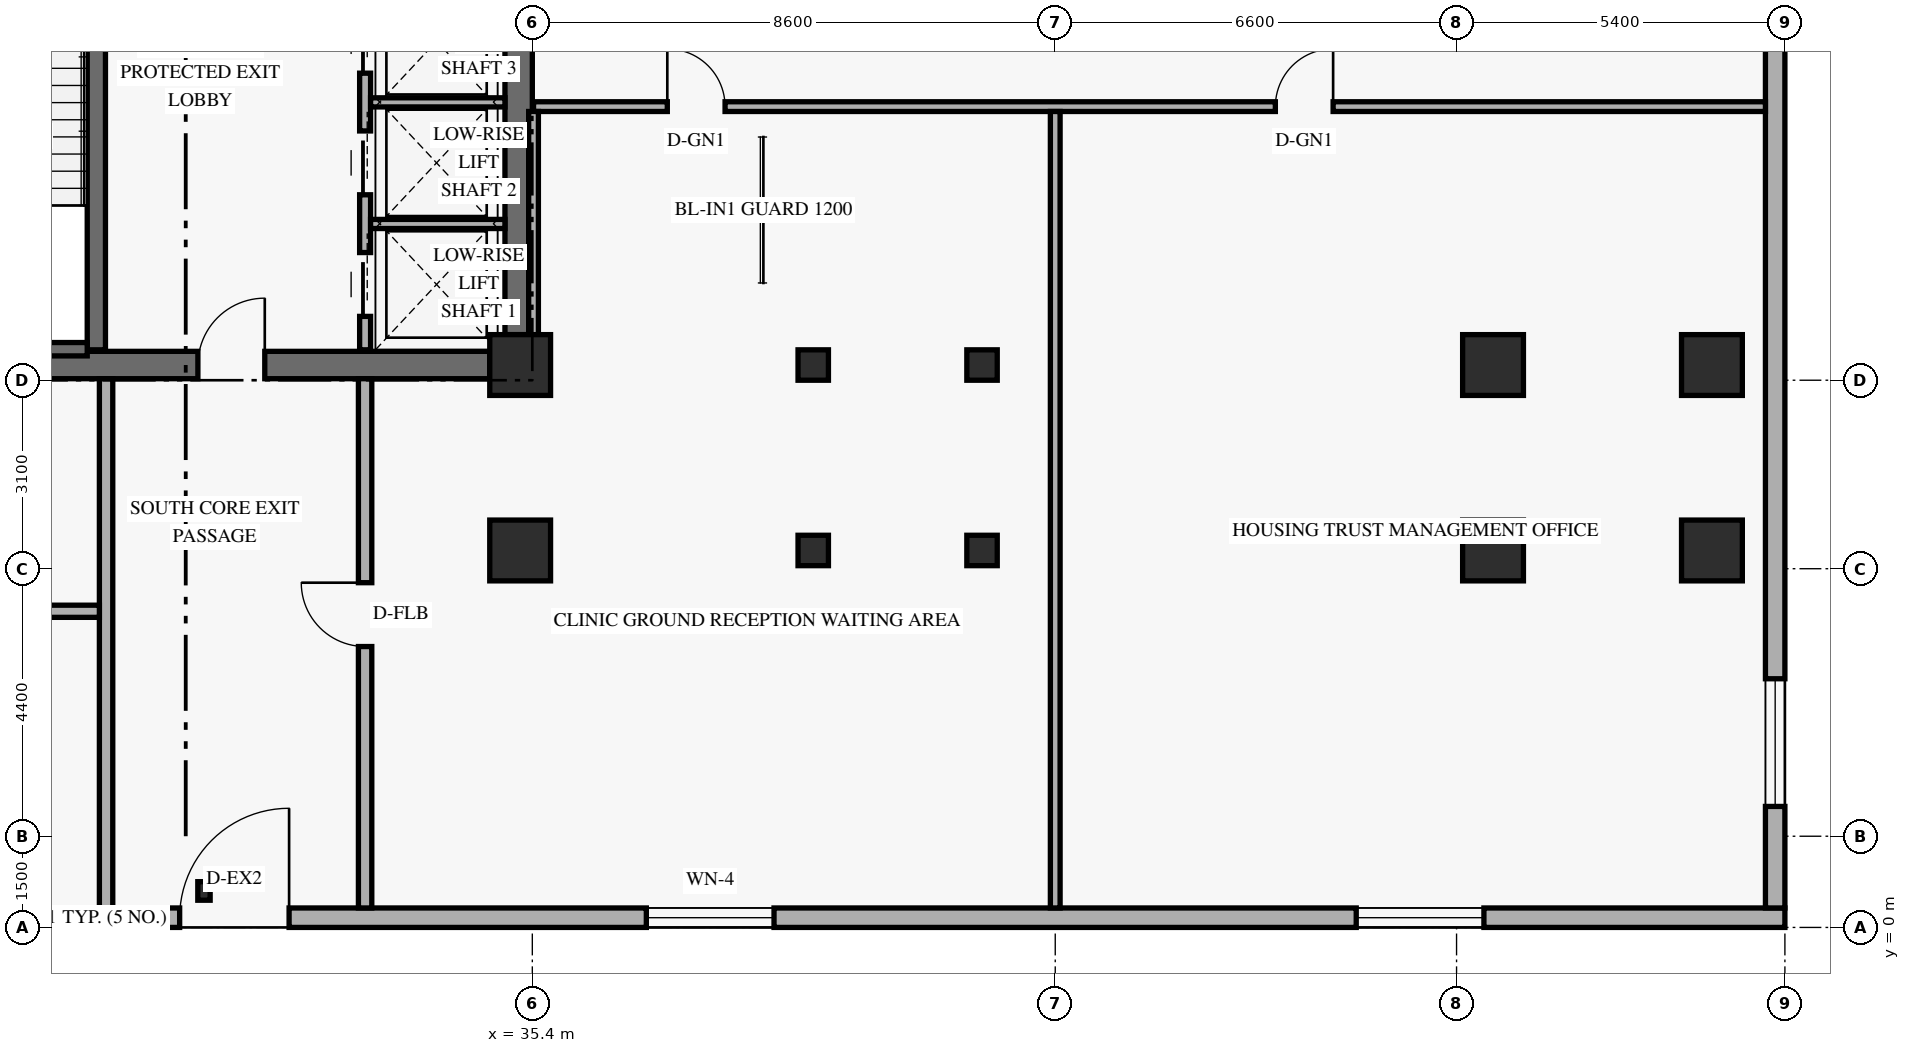
"""IFC4 building model, lengths in metres.
Left out: names, types, materials, properties, quantities, classifications, styles, units other than length and angle.
Written with IfcOpenShell. Run it as: python <this file> out.ifc"""

import sys

from ifc_helpers import new_model, si_unit, direction, frame, frame_2d, origin, origin_2d, place, context, subcontext, project, spatial, rectangle, hollow_rectangle, extrude, element, fill, save


model = new_model("IFC4")
c1 = context("Model", 3, precision=1e-05, world=origin(), true_north=direction((0.0, 1.0)))
c2 = subcontext(c1, "Body", "Model", "MODEL_VIEW")
j1 = project(units=[si_unit("LENGTHUNIT", "METRE"), si_unit("PLANEANGLEUNIT", "RADIAN")], contexts=[c1])
p1 = place(None, origin())
s1 = spatial("IfcSite", under=j1, at=p1, CompositionType="ELEMENT")
p2 = place(p1, origin())
s2 = spatial("IfcBuilding", under=s1, at=p2, CompositionType="ELEMENT")
p3 = place(p2, origin())
s3 = spatial("IfcBuildingStorey", under=s2, at=p3, CompositionType="ELEMENT", Elevation=0.0)
p4 = place(p3, frame((35.175, 9.75, 0.0), z_axis=(0.0, 0.0, 1.0), x_axis=(0.0, 1.0, 0.0)))
e1 = element("IfcWall", 1, at=p4, inside=s3, PredefinedType="SHEAR", context=c2, shape_type="SweptSolid", body=[
    extrude(rectangle(XDim=5.8, YDim=0.45, at=frame_2d((2.9, 0.0))), origin(), (0.0, 0.0, 1.0), 3.539),
])
p5 = place(p3, frame((24.7, 9.25, 0.0), z_axis=(0.0, 0.0, 1.0), x_axis=(1.0, 0.0, 0.0)))
e2 = element("IfcWall", 2, at=p5, inside=s3, PredefinedType="SHEAR", context=c2, shape_type="SweptSolid", body=[
    extrude(rectangle(XDim=10.0, YDim=0.45, at=frame_2d((5.0, 0.0))), origin(), (0.0, 0.0, 1.0), 4.39),
])
p6 = place(p5, frame((5.2, 0.0, 0.0)))
e3 = element("IfcOpeningElement", 3, at=p6, cuts=e2, PredefinedType="OPENING", context=c2, shape_type="SweptSolid", body=[
    extrude(rectangle(XDim=1.1, YDim=2.15, at=frame_2d((0.55, 1.075))), frame((0.0, 0.235, 0.0), z_axis=(0.0, -1.0, 0.0), x_axis=(1.0, 0.0, 0.0)), (0.0, 0.0, 1.0), 0.47),
])
p7 = place(p3, frame((28.23, 9.5, 0.0), z_axis=(0.0, 0.0, 1.0), x_axis=(0.0, 1.0, 0.0)))
e4 = element("IfcWall", 4, at=p7, inside=s3, PredefinedType="SHEAR", context=c2, shape_type="SweptSolid", body=[
    extrude(rectangle(XDim=7.76, YDim=0.3, at=frame_2d((3.88, 0.0))), origin(), (0.0, 0.0, 1.0), 4.39),
])
p8 = place(p3, frame((24.92, 9.51, 0.0), z_axis=(0.0, 0.0, 1.0), x_axis=(1.0, 0.0, 0.0)))
e5 = element("IfcWall", 5, at=p8, inside=s3, PredefinedType="SHEAR", context=c2, shape_type="SweptSolid", body=[
    extrude(rectangle(XDim=3.16, YDim=0.22, at=frame_2d((1.58, 0.0))), origin(), (0.0, 0.0, 1.0), 4.39),
])
for number, where, z_axis, x_axis in (
    (6, (35.2, 6.2, 0.0), (0.0, 0.0, 1.0), (1.0, 0.0, 0.0)),
    (7, (35.2, 9.25, 0.0), (0.0, 0.0, 1.0), (1.0, 0.0, 0.0)),
):
    element("IfcColumn", number, at=place(p3, frame(where, z_axis=z_axis, x_axis=x_axis)), inside=s3, PredefinedType="COLUMN", context=c2, shape_type="SweptSolid", body=[
        extrude(rectangle(XDim=1.0, YDim=1.0, at=origin_2d()), origin(), (0.0, 0.0, 1.0), 4.8),
    ])
for number, where, z_axis, x_axis in (
    (8, (39.936, 6.2, 0.0), (0.035, 0.0, 0.999), (0.0, 1.0, 0.0)),
    (9, (39.936, 9.25, 0.0), (0.035, 0.0, 0.999), (0.0, 1.0, 0.0)),
):
    element("IfcColumn", number, at=place(p3, frame(where, z_axis=z_axis, x_axis=x_axis)), inside=s3, PredefinedType="COLUMN", context=c2, shape_type="SweptSolid", body=[
        extrude(hollow_rectangle(XDim=0.5, YDim=0.5, WallThickness=0.022, at=origin_2d()), origin(), (0.0, 0.0, 1.0), 4.803),
    ])
for number, where, z_axis, x_axis in (
    (10, (42.657, 6.2, 0.0), (0.058, 0.0, 0.998), (0.0, 1.0, 0.0)),
    (11, (42.657, 9.25, 0.0), (0.058, 0.0, 0.998), (0.0, 1.0, 0.0)),
):
    element("IfcColumn", number, at=place(p3, frame(where, z_axis=z_axis, x_axis=x_axis)), inside=s3, PredefinedType="COLUMN", context=c2, shape_type="SweptSolid", body=[
        extrude(hollow_rectangle(XDim=0.5, YDim=0.5, WallThickness=0.022, at=origin_2d()), origin(), (0.0, 0.0, 1.0), 4.808),
    ])
for number, where, z_axis, x_axis in (
    (12, (51.2, 6.2, 0.0), (0.0, 0.0, 1.0), (1.0, 0.0, 0.0)),
    (13, (51.2, 9.25, 0.0), (0.0, 0.0, 1.0), (1.0, 0.0, 0.0)),
    (14, (54.8, 6.2, 0.0), (0.0, 0.0, 1.0), (1.0, 0.0, 0.0)),
    (15, (54.8, 9.25, 0.0), (0.0, 0.0, 1.0), (1.0, 0.0, 0.0)),
):
    element("IfcColumn", number, at=place(p3, frame(where, z_axis=z_axis, x_axis=x_axis)), inside=s3, PredefinedType="COLUMN", context=c2, shape_type="SweptSolid", body=[
        extrude(rectangle(XDim=1.0, YDim=1.0, at=origin_2d()), origin(), (0.0, 0.0, 1.0), 4.8),
    ])
p9 = place(p3, frame((30.0, 0.6, 0.0), z_axis=(0.0, 0.0, 1.0), x_axis=(1.0, 0.0, 0.0)))
e16 = element("IfcColumn", 16, at=p9, inside=s3, PredefinedType="PILASTER", context=c2, shape_type="SweptSolid", body=[
    extrude(hollow_rectangle(XDim=0.203, YDim=0.305, WallThickness=0.013, at=origin_2d()), origin(), (0.0, 0.0, 1.0), 4.39),
])
p10 = place(p3, frame((0.0, 0.16, 0.0), z_axis=(0.0, 0.0, 1.0), x_axis=(1.0, 0.0, 0.0)))
e17 = element("IfcWall", 17, at=p10, inside=s3, PredefinedType="SOLIDWALL", context=c2, shape_type="SweptSolid", body=[
    extrude(rectangle(XDim=56.0, YDim=0.32, at=frame_2d((28.0, 0.0))), origin(), (0.0, 0.0, 1.0), 4.39),
])
p11 = place(p10, frame((8.85, 0.0, 0.0)))
e18 = element("IfcOpeningElement", 18, at=p11, cuts=e17, PredefinedType="OPENING", context=c2, shape_type="SweptSolid", body=[
    extrude(rectangle(XDim=1.8, YDim=2.25, at=frame_2d((0.9, 1.125))), frame((0.0, 0.17, 0.0), z_axis=(0.0, -1.0, 0.0), x_axis=(1.0, 0.0, 0.0)), (0.0, 0.0, 1.0), 0.34),
])
p12 = place(p10, frame((15.2, 0.0, 0.0)))
e19 = element("IfcOpeningElement", 19, at=p12, cuts=e17, PredefinedType="OPENING", context=c2, shape_type="SweptSolid", body=[
    extrude(rectangle(XDim=2.0, YDim=2.35, at=frame_2d((1.0, 1.175))), frame((0.0, 0.17, 0.0), z_axis=(0.0, -1.0, 0.0), x_axis=(1.0, 0.0, 0.0)), (0.0, 0.0, 1.0), 0.34),
])
p13 = place(p10, frame((29.6, 0.0, 0.0)))
e20 = element("IfcOpeningElement", 20, at=p13, cuts=e17, PredefinedType="OPENING", context=c2, shape_type="SweptSolid", body=[
    extrude(rectangle(XDim=1.8, YDim=2.25, at=frame_2d((0.9, 1.125))), frame((0.0, 0.17, 0.0), z_axis=(0.0, -1.0, 0.0), x_axis=(1.0, 0.0, 0.0)), (0.0, 0.0, 1.0), 0.34),
])
p14 = place(p10, frame((3.04, 0.0, 0.85)))
e21 = element("IfcOpeningElement", 21, at=p14, cuts=e17, PredefinedType="OPENING", context=c2, shape_type="SweptSolid", body=[
    extrude(rectangle(XDim=2.1, YDim=1.75, at=frame_2d((1.05, 0.875))), frame((0.0, 0.17, 0.0), z_axis=(0.0, -1.0, 0.0), x_axis=(1.0, 0.0, 0.0)), (0.0, 0.0, 1.0), 0.34),
])
p15 = place(p10, frame((18.56, 0.0, 0.85)))
e22 = element("IfcOpeningElement", 22, at=p15, cuts=e17, PredefinedType="OPENING", context=c2, shape_type="SweptSolid", body=[
    extrude(rectangle(XDim=2.1, YDim=1.75, at=frame_2d((1.05, 0.875))), frame((0.0, 0.17, 0.0), z_axis=(0.0, -1.0, 0.0), x_axis=(1.0, 0.0, 0.0)), (0.0, 0.0, 1.0), 0.34),
])
p16 = place(p10, frame((23.745, 0.0, 0.85)))
e23 = element("IfcOpeningElement", 23, at=p16, cuts=e17, PredefinedType="OPENING", context=c2, shape_type="SweptSolid", body=[
    extrude(rectangle(XDim=2.1, YDim=1.75, at=frame_2d((1.05, 0.875))), frame((0.0, 0.17, 0.0), z_axis=(0.0, -1.0, 0.0), x_axis=(1.0, 0.0, 0.0)), (0.0, 0.0, 1.0), 0.34),
])
p17 = place(p10, frame((37.275, 0.0, 0.85)))
e24 = element("IfcOpeningElement", 24, at=p17, cuts=e17, PredefinedType="OPENING", context=c2, shape_type="SweptSolid", body=[
    extrude(rectangle(XDim=2.1, YDim=1.75, at=frame_2d((1.05, 0.875))), frame((0.0, 0.17, 0.0), z_axis=(0.0, -1.0, 0.0), x_axis=(1.0, 0.0, 0.0)), (0.0, 0.0, 1.0), 0.34),
])
p18 = place(p10, frame((48.95, 0.0, 0.85)))
e25 = element("IfcOpeningElement", 25, at=p18, cuts=e17, PredefinedType="OPENING", context=c2, shape_type="SweptSolid", body=[
    extrude(rectangle(XDim=2.1, YDim=1.75, at=frame_2d((1.05, 0.875))), frame((0.0, 0.17, 0.0), z_axis=(0.0, -1.0, 0.0), x_axis=(1.0, 0.0, 0.0)), (0.0, 0.0, 1.0), 0.34),
])
p19 = place(p3, frame((55.84, 0.32, 0.0), z_axis=(0.0, 0.0, 1.0), x_axis=(0.0, 1.0, 0.0)))
e26 = element("IfcWall", 26, at=p19, inside=s3, PredefinedType="SOLIDWALL", context=c2, shape_type="SweptSolid", body=[
    extrude(rectangle(XDim=19.18, YDim=0.32, at=frame_2d((9.59, 0.0))), origin(), (0.0, 0.0, 1.0), 4.39),
])
p20 = place(p19, frame((14.5, 0.0, 0.0)))
e27 = element("IfcOpeningElement", 27, at=p20, cuts=e26, PredefinedType="OPENING", context=c2, shape_type="SweptSolid", body=[
    extrude(rectangle(XDim=2.0, YDim=2.35, at=frame_2d((1.0, 1.175))), frame((0.0, 0.17, 0.0), z_axis=(0.0, -1.0, 0.0), x_axis=(1.0, 0.0, 0.0)), (0.0, 0.0, 1.0), 0.34),
])
p21 = place(p19, frame((1.67, 0.0, 0.85)))
e28 = element("IfcOpeningElement", 28, at=p21, cuts=e26, PredefinedType="OPENING", context=c2, shape_type="SweptSolid", body=[
    extrude(rectangle(XDim=2.1, YDim=1.75, at=frame_2d((1.05, 0.875))), frame((0.0, 0.17, 0.0), z_axis=(0.0, -1.0, 0.0), x_axis=(1.0, 0.0, 0.0)), (0.0, 0.0, 1.0), 0.34),
])
p22 = place(p19, frame((17.95, 0.0, 0.85)))
e29 = element("IfcOpeningElement", 29, at=p22, cuts=e26, PredefinedType="OPENING", context=c2, shape_type="SweptSolid", body=[
    extrude(rectangle(XDim=0.95, YDim=1.5, at=frame_2d((0.475, 0.75))), frame((0.0, 0.17, 0.0), z_axis=(0.0, -1.0, 0.0), x_axis=(1.0, 0.0, 0.0)), (0.0, 0.0, 1.0), 0.34),
])
p23 = place(p3, frame((32.65, 9.5, 0.0), z_axis=(0.0, 0.0, 1.0), x_axis=(0.0, 1.0, 0.0)))
e30 = element("IfcWall", 30, at=p23, inside=s3, PredefinedType="STANDARD", context=c2, shape_type="SweptSolid", body=[
    extrude(rectangle(XDim=5.98, YDim=0.18, at=frame_2d((2.99, 0.0))), origin(), (0.0, 0.0, 1.0), 4.39),
])
p24 = place(p23, frame((0.55, 0.0, 0.0)))
e31 = element("IfcOpeningElement", 31, at=p24, cuts=e30, PredefinedType="OPENING", context=c2, shape_type="SweptSolid", body=[
    extrude(rectangle(XDim=1.05, YDim=2.2, at=frame_2d((0.525, 1.1))), frame((0.0, 0.1, 0.0), z_axis=(0.0, -1.0, 0.0), x_axis=(1.0, 0.0, 0.0)), (0.0, 0.0, 1.0), 0.2),
])
p25 = place(p23, frame((2.55, 0.0, 0.0)))
e32 = element("IfcOpeningElement", 32, at=p25, cuts=e30, PredefinedType="OPENING", context=c2, shape_type="SweptSolid", body=[
    extrude(rectangle(XDim=1.05, YDim=2.2, at=frame_2d((0.525, 1.1))), frame((0.0, 0.1, 0.0), z_axis=(0.0, -1.0, 0.0), x_axis=(1.0, 0.0, 0.0)), (0.0, 0.0, 1.0), 0.2),
])
p26 = place(p23, frame((4.55, 0.0, 0.0)))
e33 = element("IfcOpeningElement", 33, at=p26, cuts=e30, PredefinedType="OPENING", context=c2, shape_type="SweptSolid", body=[
    extrude(rectangle(XDim=1.05, YDim=2.2, at=frame_2d((0.525, 1.1))), frame((0.0, 0.1, 0.0), z_axis=(0.0, -1.0, 0.0), x_axis=(1.0, 0.0, 0.0)), (0.0, 0.0, 1.0), 0.2),
])
for number, where, z_axis, x_axis in (
    (34, (32.74, 11.57, 0.0), (0.0, 0.0, 1.0), (1.0, 0.0, 0.0)),
    (35, (32.74, 13.57, 0.0), (0.0, 0.0, 1.0), (1.0, 0.0, 0.0)),
):
    element("IfcWall", number, at=place(p3, frame(where, z_axis=z_axis, x_axis=x_axis)), inside=s3, PredefinedType="STANDARD", context=c2, shape_type="SweptSolid", body=[
        extrude(rectangle(XDim=2.21, YDim=0.15, at=frame_2d((1.105, 0.0))), origin(), (0.0, 0.0, 1.0), 4.39),
    ])
p27 = place(p3, frame((28.39, 0.32, 0.0), z_axis=(0.0, 0.0, 1.0), x_axis=(0.0, 1.0, 0.0)))
e36 = element("IfcWall", 36, at=p27, inside=s3, PredefinedType="STANDARD", context=c2, shape_type="SweptSolid", body=[
    extrude(rectangle(XDim=8.705, YDim=0.22, at=frame_2d((4.353, 0.0))), origin(), (0.0, 0.0, 1.0), 3.761),
])
p28 = place(p3, frame((32.65, 0.32, 0.0), z_axis=(0.0, 0.0, 1.0), x_axis=(0.0, 1.0, 0.0)))
e37 = element("IfcWall", 37, at=p28, inside=s3, PredefinedType="STANDARD", context=c2, shape_type="SweptSolid", body=[
    extrude(rectangle(XDim=8.705, YDim=0.22, at=frame_2d((4.353, 0.0))), origin(), (0.0, 0.0, 1.0), 3.761),
])
p29 = place(p28, frame((4.3, 0.0, 0.0)))
e38 = element("IfcOpeningElement", 38, at=p29, cuts=e37, PredefinedType="OPENING", context=c2, shape_type="SweptSolid", body=[
    extrude(rectangle(XDim=1.05, YDim=2.15, at=frame_2d((0.525, 1.075))), frame((0.0, 0.12, 0.0), z_axis=(0.0, -1.0, 0.0), x_axis=(1.0, 0.0, 0.0)), (0.0, 0.0, 1.0), 0.24),
])
p30 = place(p3, frame((21.3, 5.2, 0.0), z_axis=(0.0, 0.0, 1.0), x_axis=(1.0, 0.0, 0.0)))
e39 = element("IfcWall", 39, at=p30, inside=s3, PredefinedType="STANDARD", context=c2, shape_type="SweptSolid", body=[
    extrude(rectangle(XDim=6.98, YDim=0.2, at=frame_2d((3.49, 0.0))), origin(), (0.0, 0.0, 1.0), 4.39),
])
p31 = place(p30, frame((1.26, 0.0, 0.0)))
e40 = element("IfcOpeningElement", 40, at=p31, cuts=e39, PredefinedType="OPENING", context=c2, shape_type="SweptSolid", body=[
    extrude(rectangle(XDim=1.05, YDim=2.15, at=frame_2d((0.525, 1.075))), frame((0.0, 0.11, 0.0), z_axis=(0.0, -1.0, 0.0), x_axis=(1.0, 0.0, 0.0)), (0.0, 0.0, 1.0), 0.22),
])
p32 = place(p3, frame((35.42, 13.5, 0.0), z_axis=(0.0, 0.0, 1.0), x_axis=(1.0, 0.0, 0.0)))
e41 = element("IfcWall", 41, at=p32, inside=s3, PredefinedType="PARTITIONING", context=c2, shape_type="SweptSolid", body=[
    extrude(rectangle(XDim=20.26, YDim=0.16, at=frame_2d((10.13, 0.0))), origin(), (0.0, 0.0, 1.0), 3.521),
])
p33 = place(p32, frame((2.2, 0.0, 0.0)))
e42 = element("IfcOpeningElement", 42, at=p33, cuts=e41, PredefinedType="OPENING", context=c2, shape_type="SweptSolid", body=[
    extrude(rectangle(XDim=0.95, YDim=2.15, at=frame_2d((0.475, 1.075))), frame((0.0, 0.09, 0.0), z_axis=(0.0, -1.0, 0.0), x_axis=(1.0, 0.0, 0.0)), (0.0, 0.0, 1.0), 0.18),
])
p34 = place(p32, frame((12.2, 0.0, 0.0)))
e43 = element("IfcOpeningElement", 43, at=p34, cuts=e41, PredefinedType="OPENING", context=c2, shape_type="SweptSolid", body=[
    extrude(rectangle(XDim=0.95, YDim=2.15, at=frame_2d((0.475, 1.075))), frame((0.0, 0.09, 0.0), z_axis=(0.0, -1.0, 0.0), x_axis=(1.0, 0.0, 0.0)), (0.0, 0.0, 1.0), 0.18),
])
p35 = place(p3, frame((35.42, 9.25, 0.0), z_axis=(0.0, 0.0, 1.0), x_axis=(0.0, 1.0, 0.0)))
e44 = element("IfcWall", 44, at=p35, inside=s3, PredefinedType="PARTITIONING", context=c2, shape_type="SweptSolid", body=[
    extrude(rectangle(XDim=4.17, YDim=0.16, at=frame_2d((2.085, 0.0))), origin(), (0.0, 0.0, 1.0), 3.521),
])
p36 = place(p3, frame((44.0, 0.32, 0.0), z_axis=(0.0, 0.0, 1.0), x_axis=(0.0, 1.0, 0.0)))
e45 = element("IfcWall", 45, at=p36, inside=s3, PredefinedType="PARTITIONING", context=c2, shape_type="SweptSolid", body=[
    extrude(rectangle(XDim=13.1, YDim=0.16, at=frame_2d((6.55, 0.0))), origin(), (0.0, 0.0, 1.0), 3.272),
])
p37 = place(p13, frame((1.8, 0.0, 0.0), z_axis=(0.0, 0.0, 1.0), x_axis=(-1.0, 0.0, 0.0)))
e46 = element("IfcDoor", 46, at=p37, inside=s3, OperationType="SINGLE_SWING_LEFT", PredefinedType="DOOR", context=c2, shape_type="SweptSolid", body=[
    extrude(rectangle(XDim=1.8, YDim=2.25, at=frame_2d((0.9, 1.125))), frame((0.0, 0.025, 0.0), z_axis=(0.0, -1.0, 0.0), x_axis=(1.0, 0.0, 0.0)), (0.0, 0.0, 1.0), 0.05),
])
fill(e20, e46)
p38 = place(p17, origin())
e47 = element("IfcWindow", 47, at=p38, inside=s3, PartitioningType="SINGLE_PANEL", PredefinedType="WINDOW", context=c2, shape_type="SweptSolid", body=[
    extrude(rectangle(XDim=2.1, YDim=1.75, at=frame_2d((1.05, 0.875))), frame((0.0, 0.03, 0.0), z_axis=(0.0, -1.0, 0.0), x_axis=(1.0, 0.0, 0.0)), (0.0, 0.0, 1.0), 0.06),
])
fill(e24, e47)
p39 = place(p18, origin())
e48 = element("IfcWindow", 48, at=p39, inside=s3, PartitioningType="SINGLE_PANEL", PredefinedType="WINDOW", context=c2, shape_type="SweptSolid", body=[
    extrude(rectangle(XDim=2.1, YDim=1.75, at=frame_2d((1.05, 0.875))), frame((0.0, 0.03, 0.0), z_axis=(0.0, -1.0, 0.0), x_axis=(1.0, 0.0, 0.0)), (0.0, 0.0, 1.0), 0.06),
])
fill(e25, e48)
p40 = place(p21, origin())
e49 = element("IfcWindow", 49, at=p40, inside=s3, PartitioningType="SINGLE_PANEL", PredefinedType="WINDOW", context=c2, shape_type="SweptSolid", body=[
    extrude(rectangle(XDim=2.1, YDim=1.75, at=frame_2d((1.05, 0.875))), frame((0.0, 0.03, 0.0), z_axis=(0.0, -1.0, 0.0), x_axis=(1.0, 0.0, 0.0)), (0.0, 0.0, 1.0), 0.06),
])
fill(e28, e49)
p41 = place(p24, origin())
e50 = element("IfcDoor", 50, at=p41, inside=s3, OperationType="SLIDING_TO_LEFT", PredefinedType="DOOR", context=c2, shape_type="SweptSolid", body=[
    extrude(rectangle(XDim=1.05, YDim=2.2, at=frame_2d((0.525, 1.1))), frame((0.0, 0.025, 0.0), z_axis=(0.0, -1.0, 0.0), x_axis=(1.0, 0.0, 0.0)), (0.0, 0.0, 1.0), 0.05),
])
fill(e31, e50)
p42 = place(p25, origin())
e51 = element("IfcDoor", 51, at=p42, inside=s3, OperationType="SLIDING_TO_LEFT", PredefinedType="DOOR", context=c2, shape_type="SweptSolid", body=[
    extrude(rectangle(XDim=1.05, YDim=2.2, at=frame_2d((0.525, 1.1))), frame((0.0, 0.025, 0.0), z_axis=(0.0, -1.0, 0.0), x_axis=(1.0, 0.0, 0.0)), (0.0, 0.0, 1.0), 0.05),
])
fill(e32, e51)
p43 = place(p26, origin())
e52 = element("IfcDoor", 52, at=p43, inside=s3, OperationType="SLIDING_TO_LEFT", PredefinedType="DOOR", context=c2, shape_type="SweptSolid", body=[
    extrude(rectangle(XDim=1.05, YDim=2.2, at=frame_2d((0.525, 1.1))), frame((0.0, 0.025, 0.0), z_axis=(0.0, -1.0, 0.0), x_axis=(1.0, 0.0, 0.0)), (0.0, 0.0, 1.0), 0.05),
])
fill(e33, e52)
p44 = place(p6, frame((1.1, 0.0, 0.0), z_axis=(0.0, 0.0, 1.0), x_axis=(-1.0, 0.0, 0.0)))
e53 = element("IfcDoor", 53, at=p44, inside=s3, OperationType="SINGLE_SWING_LEFT", PredefinedType="DOOR", context=c2, shape_type="SweptSolid", body=[
    extrude(rectangle(XDim=1.1, YDim=2.15, at=frame_2d((0.55, 1.075))), frame((0.0, 0.025, 0.0), z_axis=(0.0, -1.0, 0.0), x_axis=(1.0, 0.0, 0.0)), (0.0, 0.0, 1.0), 0.05),
])
fill(e3, e53)
p45 = place(p29, origin())
e54 = element("IfcDoor", 54, at=p45, inside=s3, OperationType="SINGLE_SWING_RIGHT", PredefinedType="DOOR", context=c2, shape_type="SweptSolid", body=[
    extrude(rectangle(XDim=1.05, YDim=2.15, at=frame_2d((0.525, 1.075))), frame((0.0, 0.025, 0.0), z_axis=(0.0, -1.0, 0.0), x_axis=(1.0, 0.0, 0.0)), (0.0, 0.0, 1.0), 0.05),
])
fill(e38, e54)
p46 = place(p33, origin())
e55 = element("IfcDoor", 55, at=p46, inside=s3, OperationType="SINGLE_SWING_LEFT", PredefinedType="DOOR", context=c2, shape_type="SweptSolid", body=[
    extrude(rectangle(XDim=0.95, YDim=2.15, at=frame_2d((0.475, 1.075))), frame((0.0, 0.025, 0.0), z_axis=(0.0, -1.0, 0.0), x_axis=(1.0, 0.0, 0.0)), (0.0, 0.0, 1.0), 0.05),
])
fill(e42, e55)
p47 = place(p34, origin())
e56 = element("IfcDoor", 56, at=p47, inside=s3, OperationType="SINGLE_SWING_RIGHT", PredefinedType="DOOR", context=c2, shape_type="SweptSolid", body=[
    extrude(rectangle(XDim=0.95, YDim=2.15, at=frame_2d((0.475, 1.075))), frame((0.0, 0.025, 0.0), z_axis=(0.0, -1.0, 0.0), x_axis=(1.0, 0.0, 0.0)), (0.0, 0.0, 1.0), 0.05),
])
fill(e43, e56)
save(model, sys.argv[1])
